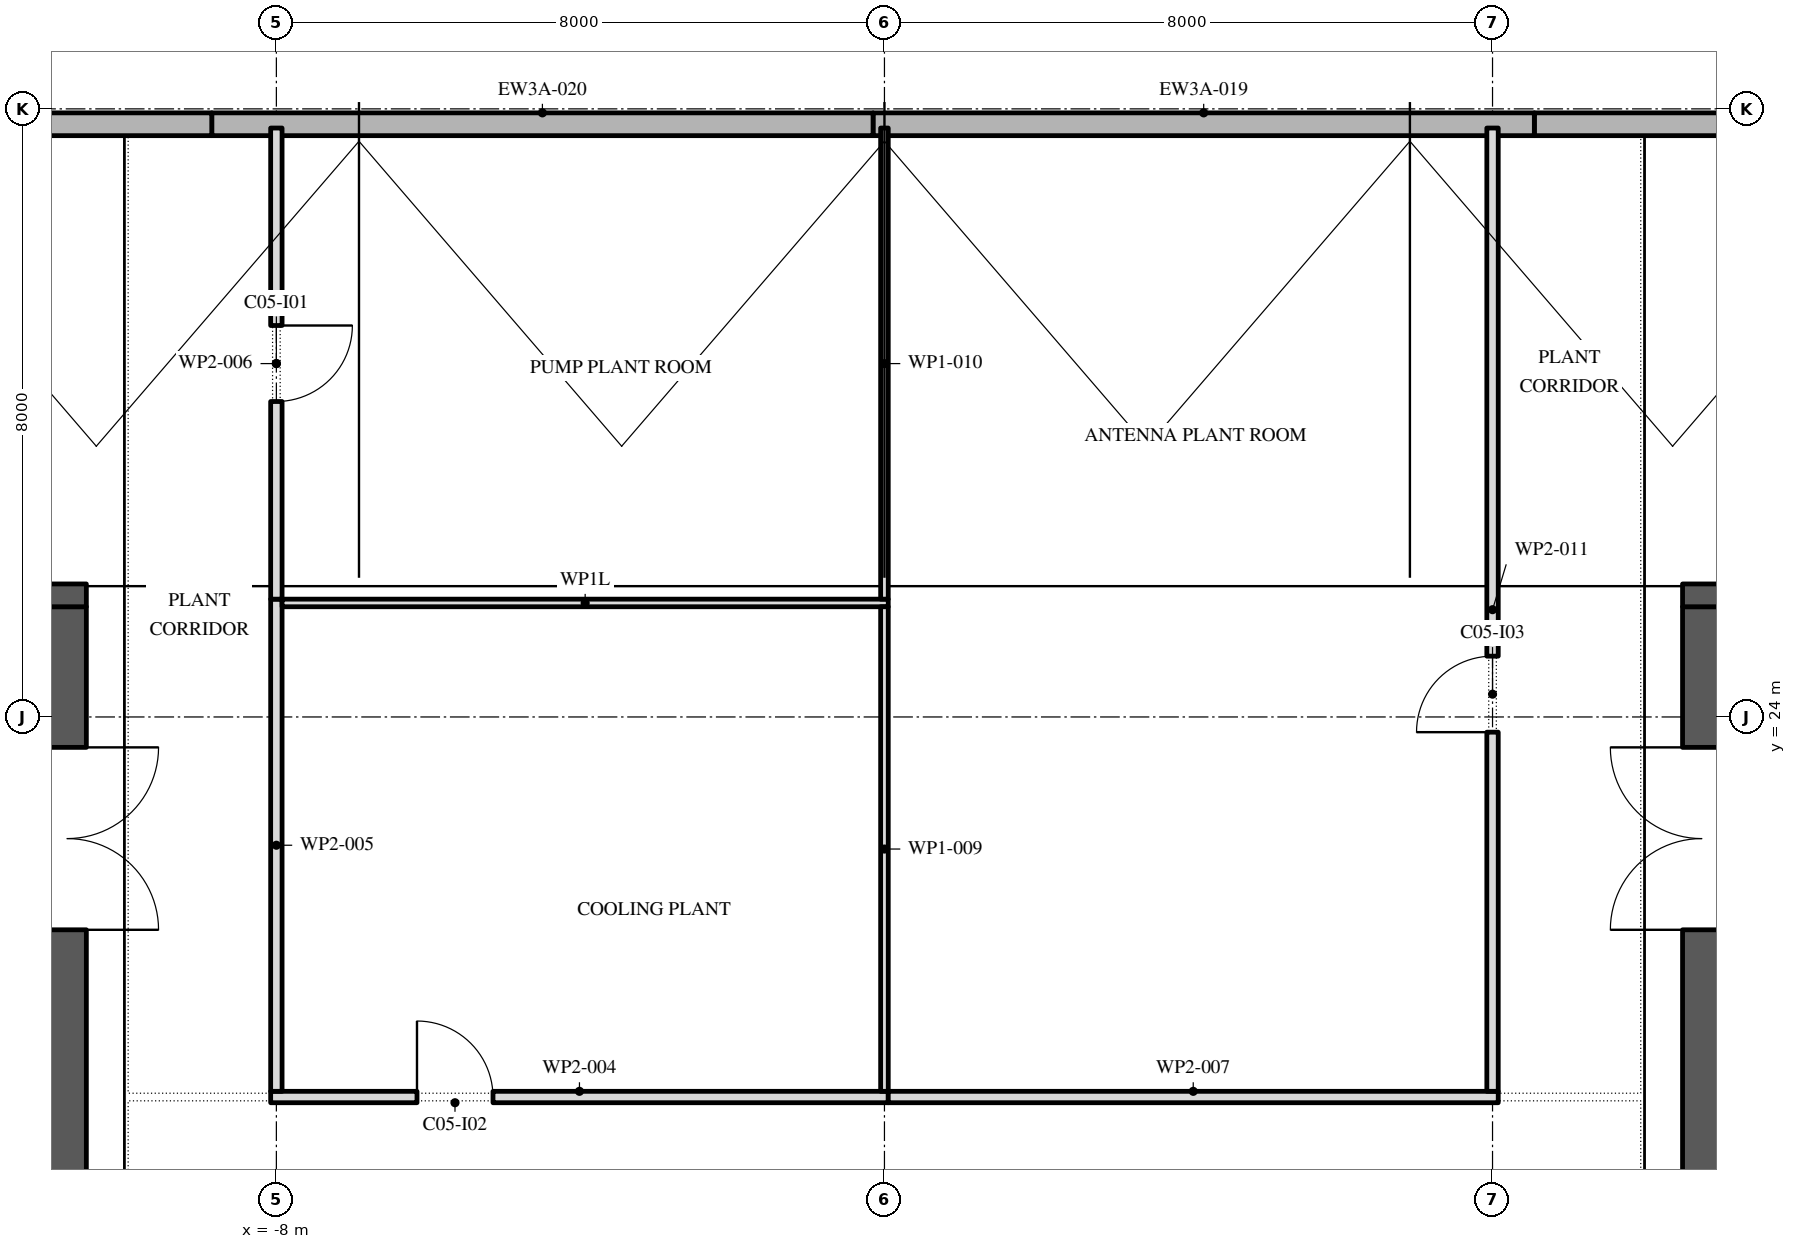
"""IFC4 building model, lengths in metres.
Left out: names, types, materials, properties, quantities, classifications, styles, units other than length and angle.
Written with IfcOpenShell. Run it as: python <this file> out.ifc"""

import sys

from ifc_helpers import new_model, si_unit, direction, frame, frame_2d, origin, place, context, subcontext, project, spatial, rectangle, extrude, element, fill, save


model = new_model("IFC4")
c1 = context("Model", 3, precision=1e-05, world=origin(), true_north=direction((0.0, 1.0)))
c2 = subcontext(c1, "Body", "Model", "MODEL_VIEW")
j1 = project(units=[si_unit("LENGTHUNIT", "METRE"), si_unit("PLANEANGLEUNIT", "RADIAN")], contexts=[c1])
p1 = place(None, origin())
s1 = spatial("IfcSite", under=j1, at=p1, CompositionType="ELEMENT")
p2 = place(p1, origin())
s2 = spatial("IfcBuilding", under=s1, at=p2, CompositionType="ELEMENT")
p3 = place(p2, frame((0.0, 0.0, 385.8)))
s3 = spatial("IfcBuildingStorey", under=s2, at=p3, CompositionType="ELEMENT", Elevation=385.8)
for number, where, z_axis, x_axis in (
    (1, (17.25, 31.798, 0.0), (0.0, 0.0, 1.0), (-1.0, 0.0, 0.0)),
    (2, (8.55, 31.798, 0.0), (0.0, 0.0, 1.0), (-1.0, 0.0, 0.0)),
):
    element("IfcWall", number, at=place(p3, frame(where, z_axis=z_axis, x_axis=x_axis)), inside=s3, PredefinedType="STANDARD", context=c2, shape_type="SweptSolid", body=[
        extrude(rectangle(XDim=8.7, YDim=0.3, at=frame_2d((4.35, 0.0))), origin(), (0.0, 0.0, 1.0), 2.199),
    ])
p4 = place(p3, frame((-0.15, 31.798, 0.0), z_axis=(0.0, 0.0, 1.0), x_axis=(-1.0, 0.0, 0.0)))
e3 = element("IfcWall", 3, at=p4, inside=s3, PredefinedType="STANDARD", context=c2, shape_type="SweptSolid", body=[
    extrude(rectangle(XDim=8.7, YDim=0.3, at=frame_2d((4.35, 0.0))), origin(), (0.0, 0.0, 1.0), 2.199),
])
p5 = place(p3, frame((-8.85, 31.798, 0.0), z_axis=(0.0, 0.0, 1.0), x_axis=(-1.0, 0.0, 0.0)))
e4 = element("IfcWall", 4, at=p5, inside=s3, PredefinedType="STANDARD", context=c2, shape_type="SweptSolid", body=[
    extrude(rectangle(XDim=8.7, YDim=0.3, at=frame_2d((4.35, 0.0))), origin(), (0.0, 0.0, 1.0), 2.199),
])
p6 = place(p3, frame((-10.75, -2.45, 0.0), z_axis=(0.0, 0.0, 1.0), x_axis=(0.0, 1.0, 0.0)))
e5 = element("IfcWall", 5, at=p6, inside=s3, PredefinedType="SHEAR", context=c2, shape_type="SweptSolid", body=[
    extrude(rectangle(XDim=27.9, YDim=0.5, at=frame_2d((13.95, 0.0))), origin(), (0.0, 0.0, 1.0), 4.0),
])
p7 = place(p6, frame((23.65, 0.0, 0.0)))
e6 = element("IfcOpeningElement", 6, at=p7, cuts=e5, PredefinedType="OPENING", context=c2, shape_type="SweptSolid", body=[
    extrude(rectangle(XDim=2.4, YDim=2.1, at=frame_2d((1.2, 1.05))), frame((0.0, 0.26, 0.0), z_axis=(0.0, -1.0, 0.0), x_axis=(1.0, 0.0, 0.0)), (0.0, 0.0, 1.0), 0.52),
])
p8 = place(p6, frame((1.387, 0.0, 0.0)))
e7 = element("IfcOpeningElement", 7, at=p8, cuts=e5, PredefinedType="OPENING", context=c2, shape_type="SweptSolid", body=[
    extrude(rectangle(XDim=0.9, YDim=2.1, at=frame_2d((0.45, 1.05))), frame((0.0, 0.26, 0.0), z_axis=(0.0, -1.0, 0.0), x_axis=(1.0, 0.0, 0.0)), (0.0, 0.0, 1.0), 0.52),
])
p9 = place(p6, frame((4.562, 0.0, 0.0)))
e8 = element("IfcOpeningElement", 8, at=p9, cuts=e5, PredefinedType="OPENING", context=c2, shape_type="SweptSolid", body=[
    extrude(rectangle(XDim=1.0, YDim=2.1, at=frame_2d((0.5, 1.05))), frame((0.0, 0.26, 0.0), z_axis=(0.0, -1.0, 0.0), x_axis=(1.0, 0.0, 0.0)), (0.0, 0.0, 1.0), 0.52),
])
p10 = place(p3, frame((-21.5, 25.6, 0.0), z_axis=(0.0, 0.0, 1.0), x_axis=(1.0, 0.0, 0.0)))
e9 = element("IfcWall", 9, at=p10, inside=s3, PredefinedType="SHEAR", context=c2, shape_type="SweptSolid", body=[
    extrude(rectangle(XDim=11.0, YDim=0.3, at=frame_2d((5.5, 0.0))), origin(), (0.0, 0.0, 1.0), 4.0),
])
p11 = place(p3, frame((10.75, -2.45, 0.0), z_axis=(0.0, 0.0, 1.0), x_axis=(0.0, 1.0, 0.0)))
e10 = element("IfcWall", 10, at=p11, inside=s3, PredefinedType="SHEAR", context=c2, shape_type="SweptSolid", body=[
    extrude(rectangle(XDim=27.9, YDim=0.5, at=frame_2d((13.95, 0.0))), origin(), (0.0, 0.0, 1.0), 4.0),
])
p12 = place(p11, frame((23.65, 0.0, 0.0)))
e11 = element("IfcOpeningElement", 11, at=p12, cuts=e10, PredefinedType="OPENING", context=c2, shape_type="SweptSolid", body=[
    extrude(rectangle(XDim=2.4, YDim=2.1, at=frame_2d((1.2, 1.05))), frame((0.0, 0.26, 0.0), z_axis=(0.0, -1.0, 0.0), x_axis=(1.0, 0.0, 0.0)), (0.0, 0.0, 1.0), 0.52),
])
p13 = place(p11, frame((0.788, 0.0, 0.0)))
e12 = element("IfcOpeningElement", 12, at=p13, cuts=e10, PredefinedType="OPENING", context=c2, shape_type="SweptSolid", body=[
    extrude(rectangle(XDim=0.9, YDim=2.1, at=frame_2d((0.45, 1.05))), frame((0.0, 0.26, 0.0), z_axis=(0.0, -1.0, 0.0), x_axis=(1.0, 0.0, 0.0)), (0.0, 0.0, 1.0), 0.52),
])
p14 = place(p11, frame((3.962, 0.0, 0.0)))
e13 = element("IfcOpeningElement", 13, at=p14, cuts=e10, PredefinedType="OPENING", context=c2, shape_type="SweptSolid", body=[
    extrude(rectangle(XDim=1.0, YDim=2.1, at=frame_2d((0.5, 1.05))), frame((0.0, 0.26, 0.0), z_axis=(0.0, -1.0, 0.0), x_axis=(1.0, 0.0, 0.0)), (0.0, 0.0, 1.0), 0.52),
])
p15 = place(p3, frame((10.5, 25.6, 0.0), z_axis=(0.0, 0.0, 1.0), x_axis=(1.0, 0.0, 0.0)))
e14 = element("IfcWall", 14, at=p15, inside=s3, PredefinedType="SHEAR", context=c2, shape_type="SweptSolid", body=[
    extrude(rectangle(XDim=11.0, YDim=0.3, at=frame_2d((5.5, 0.0))), origin(), (0.0, 0.0, 1.0), 4.0),
])
p16 = place(p3, frame((-8.075, 19.0, 0.0), z_axis=(0.0, 0.0, 1.0), x_axis=(1.0, 0.0, 0.0)))
e15 = element("IfcWall", 15, at=p16, inside=s3, PredefinedType="PARTITIONING", context=c2, shape_type="SweptSolid", body=[
    extrude(rectangle(XDim=8.125, YDim=0.15, at=frame_2d((4.062, 0.0))), origin(), (0.0, 0.0, 1.0), 4.0),
])
p17 = place(p16, frame((1.925, 0.0, 0.0)))
e16 = element("IfcOpeningElement", 16, at=p17, cuts=e15, PredefinedType="OPENING", context=c2, shape_type="SweptSolid", body=[
    extrude(rectangle(XDim=1.0, YDim=2.1, at=frame_2d((0.5, 1.05))), frame((0.0, 0.085, 0.0), z_axis=(0.0, -1.0, 0.0), x_axis=(1.0, 0.0, 0.0)), (0.0, 0.0, 1.0), 0.17),
])
p18 = place(p3, frame((-8.0, 25.55, 0.0), z_axis=(0.0, 0.0, 1.0), x_axis=(0.0, -1.0, 0.0)))
e17 = element("IfcWall", 17, at=p18, inside=s3, PredefinedType="PARTITIONING", context=c2, shape_type="SweptSolid", body=[
    extrude(rectangle(XDim=6.475, YDim=0.15, at=frame_2d((3.238, 0.0))), origin(), (0.0, 0.0, 1.0), 4.0),
])
p19 = place(p3, frame((-8.0, 31.748, 0.0), z_axis=(0.0, 0.0, 1.0), x_axis=(0.0, -1.0, 0.0)))
e18 = element("IfcWall", 18, at=p19, inside=s3, PredefinedType="PARTITIONING", context=c2, shape_type="SweptSolid", body=[
    extrude(rectangle(XDim=6.198, YDim=0.15, at=frame_2d((3.099, 0.0))), origin(), (0.0, 0.0, 1.0), 4.0),
])
p20 = place(p19, frame((2.598, 0.0, 0.0)))
e19 = element("IfcOpeningElement", 19, at=p20, cuts=e18, PredefinedType="OPENING", context=c2, shape_type="SweptSolid", body=[
    extrude(rectangle(XDim=1.0, YDim=2.1, at=frame_2d((0.5, 1.05))), frame((0.0, 0.085, 0.0), z_axis=(0.0, -1.0, 0.0), x_axis=(1.0, 0.0, 0.0)), (0.0, 0.0, 1.0), 0.17),
])
p21 = place(p3, frame((0.05, 19.0, 0.0), z_axis=(0.0, 0.0, 1.0), x_axis=(1.0, 0.0, 0.0)))
e20 = element("IfcWall", 20, at=p21, inside=s3, PredefinedType="PARTITIONING", context=c2, shape_type="SweptSolid", body=[
    extrude(rectangle(XDim=8.025, YDim=0.15, at=frame_2d((4.012, 0.0))), origin(), (0.0, 0.0, 1.0), 4.0),
])
p22 = place(p3, frame((0.05, 25.5, 0.0), z_axis=(0.0, 0.0, 1.0), x_axis=(-1.0, 0.0, 0.0)))
e21 = element("IfcWall", 21, at=p22, inside=s3, PredefinedType="PARTITIONING", context=c2, shape_type="SweptSolid", body=[
    extrude(rectangle(XDim=7.975, YDim=0.1, at=frame_2d((3.988, 0.0))), origin(), (0.0, 0.0, 1.0), 3.02),
])
p23 = place(p3, frame((0.0, 25.45, 0.0), z_axis=(0.0, 0.0, 1.0), x_axis=(0.0, -1.0, 0.0)))
e22 = element("IfcWall", 22, at=p23, inside=s3, PredefinedType="PARTITIONING", context=c2, shape_type="SweptSolid", body=[
    extrude(rectangle(XDim=6.375, YDim=0.1, at=frame_2d((3.188, 0.0))), origin(), (0.0, 0.0, 1.0), 4.0),
])
p24 = place(p3, frame((0.0, 31.748, 0.0), z_axis=(0.0, 0.0, 1.0), x_axis=(0.0, -1.0, 0.0)))
e23 = element("IfcWall", 23, at=p24, inside=s3, PredefinedType="PARTITIONING", context=c2, shape_type="SweptSolid", body=[
    extrude(rectangle(XDim=6.198, YDim=0.1, at=frame_2d((3.099, 0.0))), origin(), (0.0, 0.0, 1.0), 4.0),
])
p25 = place(p3, frame((8.0, 19.075, 0.0), z_axis=(0.0, 0.0, 1.0), x_axis=(0.0, 1.0, 0.0)))
e24 = element("IfcWall", 24, at=p25, inside=s3, PredefinedType="PARTITIONING", context=c2, shape_type="SweptSolid", body=[
    extrude(rectangle(XDim=12.673, YDim=0.15, at=frame_2d((6.336, 0.0))), origin(), (0.0, 0.0, 1.0), 4.0),
])
p26 = place(p25, frame((4.725, 0.0, 0.0)))
e25 = element("IfcOpeningElement", 25, at=p26, cuts=e24, PredefinedType="OPENING", context=c2, shape_type="SweptSolid", body=[
    extrude(rectangle(XDim=1.0, YDim=2.1, at=frame_2d((0.5, 1.05))), frame((0.0, 0.085, 0.0), z_axis=(0.0, -1.0, 0.0), x_axis=(1.0, 0.0, 0.0)), (0.0, 0.0, 1.0), 0.17),
])
p27 = place(p7, frame((2.4, 0.0, 0.0), z_axis=(0.0, 0.0, 1.0), x_axis=(-1.0, 0.0, 0.0)))
e26 = element("IfcDoor", 26, at=p27, inside=s3, OperationType="DOUBLE_DOOR_SINGLE_SWING", PredefinedType="DOOR", context=c2, shape_type="SweptSolid", body=[
    extrude(rectangle(XDim=2.4, YDim=2.1, at=frame_2d((1.2, 1.05))), frame((0.0, 0.025, 0.0), z_axis=(0.0, -1.0, 0.0), x_axis=(1.0, 0.0, 0.0)), (0.0, 0.0, 1.0), 0.05),
])
fill(e6, e26)
p28 = place(p12, origin())
e27 = element("IfcDoor", 27, at=p28, inside=s3, OperationType="DOUBLE_DOOR_SINGLE_SWING", PredefinedType="DOOR", context=c2, shape_type="SweptSolid", body=[
    extrude(rectangle(XDim=2.4, YDim=2.1, at=frame_2d((1.2, 1.05))), frame((0.0, 0.025, 0.0), z_axis=(0.0, -1.0, 0.0), x_axis=(1.0, 0.0, 0.0)), (0.0, 0.0, 1.0), 0.05),
])
fill(e11, e27)
p29 = place(p20, origin())
e28 = element("IfcDoor", 28, at=p29, inside=s3, OperationType="SINGLE_SWING_RIGHT", PredefinedType="DOOR", context=c2, shape_type="SweptSolid", body=[
    extrude(rectangle(XDim=1.0, YDim=2.1, at=frame_2d((0.5, 1.05))), frame((0.0, 0.025, 0.0), z_axis=(0.0, -1.0, 0.0), x_axis=(1.0, 0.0, 0.0)), (0.0, 0.0, 1.0), 0.05),
])
fill(e19, e28)
p30 = place(p17, origin())
e29 = element("IfcDoor", 29, at=p30, inside=s3, OperationType="SINGLE_SWING_RIGHT", PredefinedType="DOOR", context=c2, shape_type="SweptSolid", body=[
    extrude(rectangle(XDim=1.0, YDim=2.1, at=frame_2d((0.5, 1.05))), frame((0.0, 0.025, 0.0), z_axis=(0.0, -1.0, 0.0), x_axis=(1.0, 0.0, 0.0)), (0.0, 0.0, 1.0), 0.05),
])
fill(e16, e29)
p31 = place(p26, origin())
e30 = element("IfcDoor", 30, at=p31, inside=s3, OperationType="SINGLE_SWING_RIGHT", PredefinedType="DOOR", context=c2, shape_type="SweptSolid", body=[
    extrude(rectangle(XDim=1.0, YDim=2.1, at=frame_2d((0.5, 1.05))), frame((0.0, 0.025, 0.0), z_axis=(0.0, -1.0, 0.0), x_axis=(1.0, 0.0, 0.0)), (0.0, 0.0, 1.0), 0.05),
])
fill(e25, e30)
save(model, sys.argv[1])
